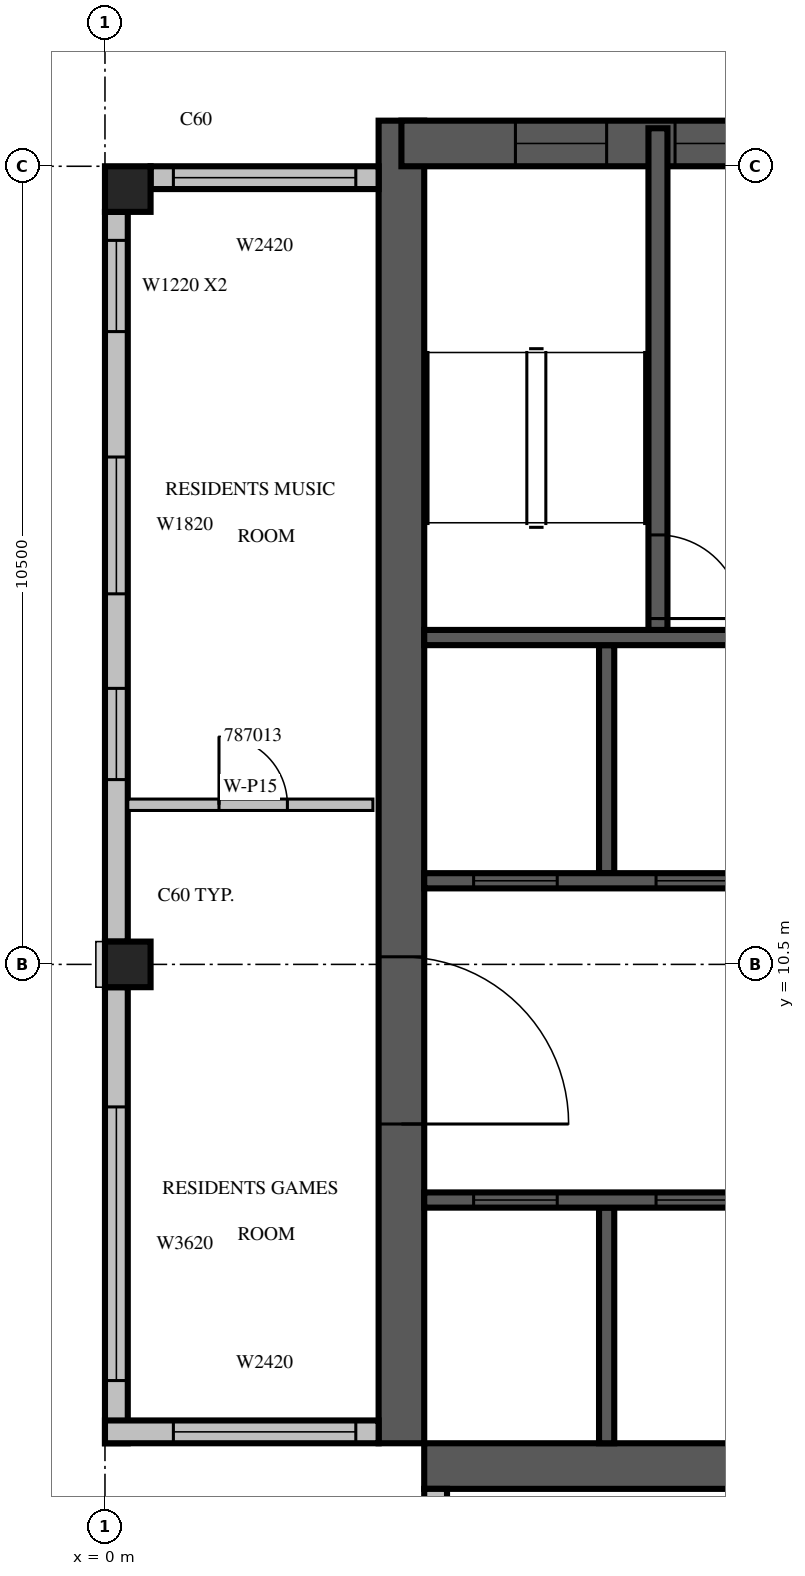
"""IFC4 building model, lengths in metres.
Left out: names, types, materials, properties, quantities, classifications, styles, units other than length and angle.
Written with IfcOpenShell. Run it as: python <this file> out.ifc"""

import sys

from ifc_helpers import new_model, si_unit, direction, frame, frame_2d, origin, origin_2d, place, context, subcontext, project, spatial, rectangle, extrude, source, transform, mapped, element, fill, save


model = new_model("IFC4")
c1 = context("Model", 3, precision=1e-05, world=origin(), true_north=direction((0.0, 1.0)))
c2 = subcontext(c1, "Body", "Model", "MODEL_VIEW")
j1 = project(units=[si_unit("LENGTHUNIT", "METRE"), si_unit("PLANEANGLEUNIT", "RADIAN")], contexts=[c1])
p1 = place(None, origin())
s1 = spatial("IfcSite", under=j1, at=p1, CompositionType="ELEMENT")
p2 = place(p1, origin())
s2 = spatial("IfcBuilding", under=s1, at=p2, CompositionType="ELEMENT")
p3 = place(p2, frame((0.0, 0.0, 365.0)))
s3 = spatial("IfcBuildingStorey", under=s2, at=p3, CompositionType="ELEMENT", Elevation=365.0)
m1 = source(origin(), c2, "Body", "SweptSolid", [
    extrude(rectangle(XDim=0.6, YDim=0.6, at=origin_2d()), origin(), (0.0, 0.0, 1.0), 3.5),
])
for number, where, z_axis, x_axis in (
    (1, (0.3, 10.5, 0.0), (0.0, 0.0, 1.0), (1.0, 0.0, 0.0)),
    (2, (0.3, 20.7, 0.0), (0.0, 0.0, 1.0), (1.0, 0.0, 0.0)),
):
    element("IfcColumn", number, at=place(p3, frame(where, z_axis=z_axis, x_axis=x_axis)), inside=s3, PredefinedType="COLUMN", context=c2, shape_type="MappedRepresentation", body=[
        mapped(m1, transform((0.0, 0.0, 0.0), scale=1.0)),
    ])
m2 = source(origin(), c2, "Body", "SweptSolid", [
    extrude(rectangle(XDim=17.4, YDim=0.6, at=frame_2d((8.7, 0.0))), origin(), (0.0, 0.0, 1.0), 3.5),
])
p4 = place(p3, frame((3.9, 4.2, 0.0), z_axis=(0.0, 0.0, 1.0), x_axis=(0.0, 1.0, 0.0)))
e3 = element("IfcWall", 3, at=p4, inside=s3, PredefinedType="SHEAR", context=c2, shape_type="MappedRepresentation", body=[
    mapped(m2, transform((0.0, 0.0, 0.0), scale=1.0)),
])
m3 = source(origin(), c2, "Body", "SweptSolid", [
    extrude(rectangle(XDim=2.2, YDim=2.1, at=frame_2d((1.1, 1.05))), frame((0.0, 0.31, 0.0), z_axis=(0.0, -1.0, 0.0), x_axis=(1.0, 0.0, 0.0)), (0.0, 0.0, 1.0), 0.62),
])
p5 = place(p4, frame((4.2, 0.0, 0.0)))
e4 = element("IfcOpeningElement", 4, at=p5, cuts=e3, PredefinedType="OPENING", context=c2, shape_type="MappedRepresentation", body=[
    mapped(m3, transform((0.0, 0.0, 0.0), scale=1.0)),
])
p6 = place(p3, frame((4.2, 3.9, 0.0), z_axis=(0.0, 0.0, 1.0), x_axis=(1.0, 0.0, 0.0)))
e5 = element("IfcWall", 5, at=p6, inside=s3, PredefinedType="SHEAR", context=c2, shape_type="MappedRepresentation", body=[
    mapped(m2, transform((0.0, 0.0, 0.0), scale=1.0)),
])
m4 = source(origin(), c2, "Body", "SweptSolid", [
    extrude(rectangle(XDim=0.9, YDim=2.1, at=frame_2d((0.45, 1.05))), frame((0.0, 0.31, 0.0), z_axis=(0.0, -1.0, 0.0), x_axis=(1.0, 0.0, 0.0)), (0.0, 0.0, 1.0), 0.62),
])
p7 = place(p6, frame((15.2, 0.0, 0.0)))
e6 = element("IfcOpeningElement", 6, at=p7, cuts=e5, PredefinedType="OPENING", context=c2, shape_type="MappedRepresentation", body=[
    mapped(m4, transform((0.0, 0.0, 0.0), scale=1.0)),
])
m5 = source(origin(), c2, "Body", "SweptSolid", [
    extrude(rectangle(XDim=6.6, YDim=0.6, at=frame_2d((3.3, 0.0))), origin(), (0.0, 0.0, 1.0), 3.5),
])
p8 = place(p3, frame((3.9, 21.3, 0.0), z_axis=(0.0, 0.0, 1.0), x_axis=(1.0, 0.0, 0.0)))
e7 = element("IfcWall", 7, at=p8, inside=s3, PredefinedType="SHEAR", context=c2, shape_type="MappedRepresentation", body=[
    mapped(m5, transform((0.0, 0.0, 0.0), scale=1.0)),
])
m6 = source(origin(), c2, "Body", "SweptSolid", [
    extrude(rectangle(XDim=1.2, YDim=2.4, at=frame_2d((0.6, 1.2))), frame((0.0, 0.31, 0.0), z_axis=(0.0, -1.0, 0.0), x_axis=(1.0, 0.0, 0.0)), (0.0, 0.0, 1.0), 0.62),
])
p9 = place(p8, frame((1.5, 0.0, 0.6)))
e8 = element("IfcOpeningElement", 8, at=p9, cuts=e7, PredefinedType="OPENING", context=c2, shape_type="MappedRepresentation", body=[
    mapped(m6, transform((0.0, 0.0, 0.0), scale=1.0)),
])
p10 = place(p8, frame((3.6, 0.0, 0.6)))
e9 = element("IfcOpeningElement", 9, at=p10, cuts=e7, PredefinedType="OPENING", context=c2, shape_type="MappedRepresentation", body=[
    mapped(m6, transform((0.0, 0.0, 0.0), scale=1.0)),
])
p11 = place(p3, frame((3.6, 20.85, 0.0), z_axis=(0.0, 0.0, 1.0), x_axis=(-1.0, 0.0, 0.0)))
e10 = element("IfcWall", 10, at=p11, inside=s3, PredefinedType="STANDARD", context=c2, shape_type="SweptSolid", body=[
    extrude(rectangle(XDim=3.0, YDim=0.3, at=frame_2d((1.5, 0.0))), origin(), (0.0, 0.0, 1.0), 3.05),
])
m7 = source(origin(), c2, "Body", "SweptSolid", [
    extrude(rectangle(XDim=2.4, YDim=2.0, at=frame_2d((1.2, 1.0))), frame((0.0, 0.16, 0.0), z_axis=(0.0, -1.0, 0.0), x_axis=(1.0, 0.0, 0.0)), (0.0, 0.0, 1.0), 0.32),
])
p12 = place(p11, frame((0.3, 0.0, 0.6)))
e11 = element("IfcOpeningElement", 11, at=p12, cuts=e10, PredefinedType="OPENING", context=c2, shape_type="MappedRepresentation", body=[
    mapped(m7, transform((0.0, 0.0, 0.0), scale=1.0)),
])
p13 = place(p3, frame((0.15, 20.4, 0.0), z_axis=(0.0, 0.0, 1.0), x_axis=(0.0, -1.0, 0.0)))
e12 = element("IfcWall", 12, at=p13, inside=s3, PredefinedType="STANDARD", context=c2, shape_type="SweptSolid", body=[
    extrude(rectangle(XDim=9.6, YDim=0.3, at=frame_2d((4.8, 0.0))), origin(), (0.0, 0.0, 1.0), 3.05),
])
m8 = source(origin(), c2, "Body", "SweptSolid", [
    extrude(rectangle(XDim=1.2, YDim=2.0, at=frame_2d((0.6, 1.0))), frame((0.0, 0.16, 0.0), z_axis=(0.0, -1.0, 0.0), x_axis=(1.0, 0.0, 0.0)), (0.0, 0.0, 1.0), 0.32),
])
p14 = place(p13, frame((0.375, 0.0, 0.6)))
e13 = element("IfcOpeningElement", 13, at=p14, cuts=e12, PredefinedType="OPENING", context=c2, shape_type="MappedRepresentation", body=[
    mapped(m8, transform((0.0, 0.0, 0.0), scale=1.0)),
])
m9 = source(origin(), c2, "Body", "SweptSolid", [
    extrude(rectangle(XDim=1.8, YDim=2.0, at=frame_2d((0.9, 1.0))), frame((0.0, 0.16, 0.0), z_axis=(0.0, -1.0, 0.0), x_axis=(1.0, 0.0, 0.0)), (0.0, 0.0, 1.0), 0.32),
])
p15 = place(p13, frame((3.225, 0.0, 0.6)))
e14 = element("IfcOpeningElement", 14, at=p15, cuts=e12, PredefinedType="OPENING", context=c2, shape_type="MappedRepresentation", body=[
    mapped(m9, transform((0.0, 0.0, 0.0), scale=1.0)),
])
p16 = place(p13, frame((6.269, 0.0, 0.6)))
e15 = element("IfcOpeningElement", 15, at=p16, cuts=e12, PredefinedType="OPENING", context=c2, shape_type="MappedRepresentation", body=[
    mapped(m8, transform((0.0, 0.0, 0.0), scale=1.0)),
])
m10 = source(origin(), c2, "Body", "SweptSolid", [
    extrude(rectangle(XDim=6.0, YDim=0.3, at=frame_2d((3.0, 0.0))), origin(), (0.0, 0.0, 1.0), 3.05),
])
p17 = place(p3, frame((0.15, 10.2, 0.0), z_axis=(0.0, 0.0, 1.0), x_axis=(0.0, -1.0, 0.0)))
e16 = element("IfcWall", 16, at=p17, inside=s3, PredefinedType="STANDARD", context=c2, shape_type="MappedRepresentation", body=[
    mapped(m10, transform((0.0, 0.0, 0.0), scale=1.0)),
])
m11 = source(origin(), c2, "Body", "SweptSolid", [
    extrude(rectangle(XDim=3.6, YDim=2.0, at=frame_2d((1.8, 1.0))), frame((0.0, 0.16, 0.0), z_axis=(0.0, -1.0, 0.0), x_axis=(1.0, 0.0, 0.0)), (0.0, 0.0, 1.0), 0.32),
])
p18 = place(p17, frame((1.575, 0.0, 0.6)))
e17 = element("IfcOpeningElement", 17, at=p18, cuts=e16, PredefinedType="OPENING", context=c2, shape_type="MappedRepresentation", body=[
    mapped(m11, transform((0.0, 0.0, 0.0), scale=1.0)),
])
p19 = place(p3, frame((0.0, 4.35, 0.0), z_axis=(0.0, 0.0, 1.0), x_axis=(1.0, 0.0, 0.0)))
e18 = element("IfcWall", 18, at=p19, inside=s3, PredefinedType="STANDARD", context=c2, shape_type="SweptSolid", body=[
    extrude(rectangle(XDim=3.6, YDim=0.3, at=frame_2d((1.8, 0.0))), origin(), (0.0, 0.0, 1.0), 3.05),
])
p20 = place(p19, frame((0.9, 0.0, 0.6)))
e19 = element("IfcOpeningElement", 19, at=p20, cuts=e18, PredefinedType="OPENING", context=c2, shape_type="MappedRepresentation", body=[
    mapped(m7, transform((0.0, 0.0, 0.0), scale=1.0)),
])
m12 = source(origin(), c2, "Body", "SweptSolid", [
    extrude(rectangle(XDim=3.6, YDim=0.3, at=frame_2d((1.8, 0.0))), origin(), (0.0, 0.0, 1.0), 3.05),
])
p21 = place(p3, frame((4.35, 3.6, 0.0), z_axis=(0.0, 0.0, 1.0), x_axis=(0.0, -1.0, 0.0)))
e20 = element("IfcWall", 20, at=p21, inside=s3, PredefinedType="STANDARD", context=c2, shape_type="MappedRepresentation", body=[
    mapped(m12, transform((0.0, 0.0, 0.0), scale=1.0)),
])
p22 = place(p21, frame((0.3, 0.0, 0.6)))
e21 = element("IfcOpeningElement", 21, at=p22, cuts=e20, PredefinedType="OPENING", context=c2, shape_type="MappedRepresentation", body=[
    mapped(m7, transform((0.0, 0.0, 0.0), scale=1.0)),
])
m13 = source(origin(), c2, "Body", "SweptSolid", [
    extrude(rectangle(XDim=3.1, YDim=0.2, at=frame_2d((1.55, 0.0))), origin(), (0.0, 0.0, 1.0), 3.5),
])
p23 = place(p3, frame((6.6, 4.2, 0.0), z_axis=(0.0, 0.0, 1.0), x_axis=(0.0, 1.0, 0.0)))
e22 = element("IfcWall", 22, at=p23, inside=s3, PredefinedType="SOLIDWALL", context=c2, shape_type="MappedRepresentation", body=[
    mapped(m13, transform((0.0, 0.0, 0.0), scale=1.0)),
])
m14 = source(origin(), c2, "Body", "SweptSolid", [
    extrude(rectangle(XDim=3.0, YDim=0.2, at=frame_2d((1.5, 0.0))), origin(), (0.0, 0.0, 1.0), 3.5),
])
p24 = place(p3, frame((6.6, 11.7, 0.0), z_axis=(0.0, 0.0, 1.0), x_axis=(0.0, 1.0, 0.0)))
e23 = element("IfcWall", 23, at=p24, inside=s3, PredefinedType="SOLIDWALL", context=c2, shape_type="MappedRepresentation", body=[
    mapped(m14, transform((0.0, 0.0, 0.0), scale=1.0)),
])
m15 = source(origin(), c2, "Body", "SweptSolid", [
    extrude(rectangle(XDim=9.6, YDim=0.2, at=frame_2d((4.8, 0.0))), origin(), (0.0, 0.0, 1.0), 3.5),
])
p25 = place(p3, frame((4.2, 7.4, 0.0), z_axis=(0.0, 0.0, 1.0), x_axis=(1.0, 0.0, 0.0)))
e24 = element("IfcWall", 24, at=p25, inside=s3, PredefinedType="SOLIDWALL", context=c2, shape_type="MappedRepresentation", body=[
    mapped(m15, transform((0.0, 0.0, 0.0), scale=1.0)),
])
m16 = source(origin(), c2, "Body", "SweptSolid", [
    extrude(rectangle(XDim=1.1, YDim=2.1, at=frame_2d((0.55, 1.05))), frame((0.0, 0.11, 0.0), z_axis=(0.0, -1.0, 0.0), x_axis=(1.0, 0.0, 0.0)), (0.0, 0.0, 1.0), 0.22),
])
p26 = place(p25, frame((0.65, 0.0, 0.0)))
e25 = element("IfcOpeningElement", 25, at=p26, cuts=e24, PredefinedType="OPENING", context=c2, shape_type="MappedRepresentation", body=[
    mapped(m16, transform((0.0, 0.0, 0.0), scale=1.0)),
])
p27 = place(p25, frame((3.05, 0.0, 0.0)))
e26 = element("IfcOpeningElement", 26, at=p27, cuts=e24, PredefinedType="OPENING", context=c2, shape_type="MappedRepresentation", body=[
    mapped(m16, transform((0.0, 0.0, 0.0), scale=1.0)),
])
p28 = place(p25, frame((5.45, 0.0, 0.0)))
e27 = element("IfcOpeningElement", 27, at=p28, cuts=e24, PredefinedType="OPENING", context=c2, shape_type="MappedRepresentation", body=[
    mapped(m16, transform((0.0, 0.0, 0.0), scale=1.0)),
])
p29 = place(p25, frame((7.85, 0.0, 0.0)))
e28 = element("IfcOpeningElement", 28, at=p29, cuts=e24, PredefinedType="OPENING", context=c2, shape_type="MappedRepresentation", body=[
    mapped(m16, transform((0.0, 0.0, 0.0), scale=1.0)),
])
m17 = source(origin(), c2, "Body", "SweptSolid", [
    extrude(rectangle(XDim=4.8, YDim=0.2, at=frame_2d((2.4, 0.0))), origin(), (0.0, 0.0, 1.0), 3.5),
])
p30 = place(p3, frame((4.2, 11.6, 0.0), z_axis=(0.0, 0.0, 1.0), x_axis=(1.0, 0.0, 0.0)))
e29 = element("IfcWall", 29, at=p30, inside=s3, PredefinedType="SOLIDWALL", context=c2, shape_type="MappedRepresentation", body=[
    mapped(m17, transform((0.0, 0.0, 0.0), scale=1.0)),
])
p31 = place(p30, frame((0.65, 0.0, 0.0)))
e30 = element("IfcOpeningElement", 30, at=p31, cuts=e29, PredefinedType="OPENING", context=c2, shape_type="MappedRepresentation", body=[
    mapped(m16, transform((0.0, 0.0, 0.0), scale=1.0)),
])
p32 = place(p30, frame((3.05, 0.0, 0.0)))
e31 = element("IfcOpeningElement", 31, at=p32, cuts=e29, PredefinedType="OPENING", context=c2, shape_type="MappedRepresentation", body=[
    mapped(m16, transform((0.0, 0.0, 0.0), scale=1.0)),
])
p33 = place(p3, frame((4.2, 14.8, 0.0), z_axis=(0.0, 0.0, 1.0), x_axis=(1.0, 0.0, 0.0)))
e32 = element("IfcWall", 32, at=p33, inside=s3, PredefinedType="SOLIDWALL", context=c2, shape_type="MappedRepresentation", body=[
    mapped(m17, transform((0.0, 0.0, 0.0), scale=1.0)),
])
p34 = place(p3, frame((7.275, 14.9, 0.0), z_axis=(0.0, 0.0, 1.0), x_axis=(0.0, 1.0, 0.0)))
e33 = element("IfcWall", 33, at=p34, inside=s3, PredefinedType="SOLIDWALL", context=c2, shape_type="SweptSolid", body=[
    extrude(rectangle(XDim=6.6, YDim=0.25, at=frame_2d((3.3, 0.0))), origin(), (0.0, 0.0, 1.0), 3.05),
])
m18 = source(origin(), c2, "Body", "SweptSolid", [
    extrude(rectangle(XDim=1.1, YDim=2.1, at=frame_2d((0.55, 1.05))), frame((0.0, 0.135, 0.0), z_axis=(0.0, -1.0, 0.0), x_axis=(1.0, 0.0, 0.0)), (0.0, 0.0, 1.0), 0.27),
])
p35 = place(p34, frame((0.15, 0.0, 0.0)))
e34 = element("IfcOpeningElement", 34, at=p35, cuts=e33, PredefinedType="OPENING", context=c2, shape_type="MappedRepresentation", body=[
    mapped(m18, transform((0.0, 0.0, 0.0), scale=1.0)),
])
m19 = source(origin(), c2, "Body", "SweptSolid", [
    extrude(rectangle(XDim=3.225, YDim=0.15, at=frame_2d((1.613, 0.0))), origin(), (0.0, 0.0, 1.0), 3.05),
])
p36 = place(p3, frame((0.3, 12.6, 0.0), z_axis=(0.0, 0.0, 1.0), x_axis=(1.0, 0.0, 0.0)))
e35 = element("IfcWall", 35, at=p36, inside=s3, PredefinedType="PARTITIONING", context=c2, shape_type="MappedRepresentation", body=[
    mapped(m19, transform((0.0, 0.0, 0.0), scale=1.0)),
])
m20 = source(origin(), c2, "Body", "SweptSolid", [
    extrude(rectangle(XDim=0.9, YDim=2.1, at=frame_2d((0.45, 1.05))), frame((0.0, 0.085, 0.0), z_axis=(0.0, -1.0, 0.0), x_axis=(1.0, 0.0, 0.0)), (0.0, 0.0, 1.0), 0.17),
])
p37 = place(p36, frame((1.2, 0.0, 0.0)))
e36 = element("IfcOpeningElement", 36, at=p37, cuts=e35, PredefinedType="OPENING", context=c2, shape_type="MappedRepresentation", body=[
    mapped(m20, transform((0.0, 0.0, 0.0), scale=1.0)),
])
m21 = source(origin(), c2, "Body", "SweptSolid", [
    extrude(rectangle(XDim=2.4, YDim=2.0, at=frame_2d((1.2, 1.0))), frame((0.0, 0.03, 0.0), z_axis=(0.0, -1.0, 0.0), x_axis=(1.0, 0.0, 0.0)), (0.0, 0.0, 1.0), 0.06),
])
p38 = place(p12, origin())
e37 = element("IfcWindow", 37, at=p38, inside=s3, PartitioningType="SINGLE_PANEL", PredefinedType="WINDOW", context=c2, shape_type="MappedRepresentation", body=[
    mapped(m21, transform((0.0, 0.0, 0.0), scale=1.0)),
])
fill(e11, e37)
m22 = source(origin(), c2, "Body", "SweptSolid", [
    extrude(rectangle(XDim=1.2, YDim=2.0, at=frame_2d((0.6, 1.0))), frame((0.0, 0.03, 0.0), z_axis=(0.0, -1.0, 0.0), x_axis=(1.0, 0.0, 0.0)), (0.0, 0.0, 1.0), 0.06),
])
p39 = place(p14, origin())
e38 = element("IfcWindow", 38, at=p39, inside=s3, PartitioningType="SINGLE_PANEL", PredefinedType="WINDOW", context=c2, shape_type="MappedRepresentation", body=[
    mapped(m22, transform((0.0, 0.0, 0.0), scale=1.0)),
])
fill(e13, e38)
m23 = source(origin(), c2, "Body", "SweptSolid", [
    extrude(rectangle(XDim=1.8, YDim=2.0, at=frame_2d((0.9, 1.0))), frame((0.0, 0.03, 0.0), z_axis=(0.0, -1.0, 0.0), x_axis=(1.0, 0.0, 0.0)), (0.0, 0.0, 1.0), 0.06),
])
p40 = place(p15, origin())
e39 = element("IfcWindow", 39, at=p40, inside=s3, PartitioningType="SINGLE_PANEL", PredefinedType="WINDOW", context=c2, shape_type="MappedRepresentation", body=[
    mapped(m23, transform((0.0, 0.0, 0.0), scale=1.0)),
])
fill(e14, e39)
m24 = source(origin(), c2, "Body", "SweptSolid", [
    extrude(rectangle(XDim=3.6, YDim=2.0, at=frame_2d((1.8, 1.0))), frame((0.0, 0.03, 0.0), z_axis=(0.0, -1.0, 0.0), x_axis=(1.0, 0.0, 0.0)), (0.0, 0.0, 1.0), 0.06),
])
p41 = place(p18, origin())
e40 = element("IfcWindow", 40, at=p41, inside=s3, PartitioningType="SINGLE_PANEL", PredefinedType="WINDOW", context=c2, shape_type="MappedRepresentation", body=[
    mapped(m24, transform((0.0, 0.0, 0.0), scale=1.0)),
])
fill(e17, e40)
p42 = place(p16, origin())
e41 = element("IfcWindow", 41, at=p42, inside=s3, PartitioningType="SINGLE_PANEL", PredefinedType="WINDOW", context=c2, shape_type="MappedRepresentation", body=[
    mapped(m22, transform((0.0, 0.0, 0.0), scale=1.0)),
])
fill(e15, e41)
p43 = place(p20, origin())
e42 = element("IfcWindow", 42, at=p43, inside=s3, PartitioningType="SINGLE_PANEL", PredefinedType="WINDOW", context=c2, shape_type="MappedRepresentation", body=[
    mapped(m21, transform((0.0, 0.0, 0.0), scale=1.0)),
])
fill(e19, e42)
m25 = source(origin(), c2, "Body", "SweptSolid", [
    extrude(rectangle(XDim=1.1, YDim=2.1, at=frame_2d((0.55, 1.05))), frame((0.0, 0.025, 0.0), z_axis=(0.0, -1.0, 0.0), x_axis=(1.0, 0.0, 0.0)), (0.0, 0.0, 1.0), 0.05),
])
p44 = place(p26, origin())
e43 = element("IfcDoor", 43, at=p44, inside=s3, OperationType="SLIDING_TO_LEFT", PredefinedType="DOOR", context=c2, shape_type="MappedRepresentation", body=[
    mapped(m25, transform((0.0, 0.0, 0.0), scale=1.0)),
])
fill(e25, e43)
p45 = place(p27, origin())
e44 = element("IfcDoor", 44, at=p45, inside=s3, OperationType="SLIDING_TO_LEFT", PredefinedType="DOOR", context=c2, shape_type="MappedRepresentation", body=[
    mapped(m25, transform((0.0, 0.0, 0.0), scale=1.0)),
])
fill(e26, e44)
p46 = place(p31, origin())
e45 = element("IfcDoor", 45, at=p46, inside=s3, OperationType="SLIDING_TO_LEFT", PredefinedType="DOOR", context=c2, shape_type="MappedRepresentation", body=[
    mapped(m25, transform((0.0, 0.0, 0.0), scale=1.0)),
])
fill(e30, e45)
p47 = place(p32, origin())
e46 = element("IfcDoor", 46, at=p47, inside=s3, OperationType="SLIDING_TO_LEFT", PredefinedType="DOOR", context=c2, shape_type="MappedRepresentation", body=[
    mapped(m25, transform((0.0, 0.0, 0.0), scale=1.0)),
])
fill(e31, e46)
p48 = place(p35, origin())
e47 = element("IfcDoor", 47, at=p48, inside=s3, OperationType="SINGLE_SWING_RIGHT", PredefinedType="DOOR", context=c2, shape_type="MappedRepresentation", body=[
    mapped(m25, transform((0.0, 0.0, 0.0), scale=1.0)),
])
fill(e34, e47)
m26 = source(origin(), c2, "Body", "SweptSolid", [
    extrude(rectangle(XDim=2.2, YDim=2.1, at=frame_2d((1.1, 1.05))), frame((0.0, 0.025, 0.0), z_axis=(0.0, -1.0, 0.0), x_axis=(1.0, 0.0, 0.0)), (0.0, 0.0, 1.0), 0.05),
])
p49 = place(p5, origin())
e48 = element("IfcDoor", 48, at=p49, inside=s3, OperationType="DOUBLE_DOOR_SINGLE_SWING", PredefinedType="DOOR", context=c2, shape_type="MappedRepresentation", body=[
    mapped(m26, transform((0.0, 0.0, 0.0), scale=1.0)),
])
fill(e4, e48)
m27 = source(origin(), c2, "Body", "SweptSolid", [
    extrude(rectangle(XDim=1.2, YDim=2.4, at=frame_2d((0.6, 1.2))), frame((0.0, 0.03, 0.0), z_axis=(0.0, -1.0, 0.0), x_axis=(1.0, 0.0, 0.0)), (0.0, 0.0, 1.0), 0.06),
])
p50 = place(p9, origin())
e49 = element("IfcWindow", 49, at=p50, inside=s3, PartitioningType="SINGLE_PANEL", PredefinedType="WINDOW", context=c2, shape_type="MappedRepresentation", body=[
    mapped(m27, transform((0.0, 0.0, 0.0), scale=1.0)),
])
fill(e8, e49)
p51 = place(p10, origin())
e50 = element("IfcWindow", 50, at=p51, inside=s3, PartitioningType="SINGLE_PANEL", PredefinedType="WINDOW", context=c2, shape_type="MappedRepresentation", body=[
    mapped(m27, transform((0.0, 0.0, 0.0), scale=1.0)),
])
fill(e9, e50)
m28 = source(origin(), c2, "Body", "SweptSolid", [
    extrude(rectangle(XDim=0.9, YDim=2.1, at=frame_2d((0.45, 1.05))), frame((0.0, 0.025, 0.0), z_axis=(0.0, -1.0, 0.0), x_axis=(1.0, 0.0, 0.0)), (0.0, 0.0, 1.0), 0.05),
])
p52 = place(p37, origin())
e51 = element("IfcDoor", 51, at=p52, inside=s3, OperationType="SINGLE_SWING_LEFT", PredefinedType="DOOR", context=c2, shape_type="MappedRepresentation", body=[
    mapped(m28, transform((0.0, 0.0, 0.0), scale=1.0)),
])
fill(e36, e51)
save(model, sys.argv[1])
